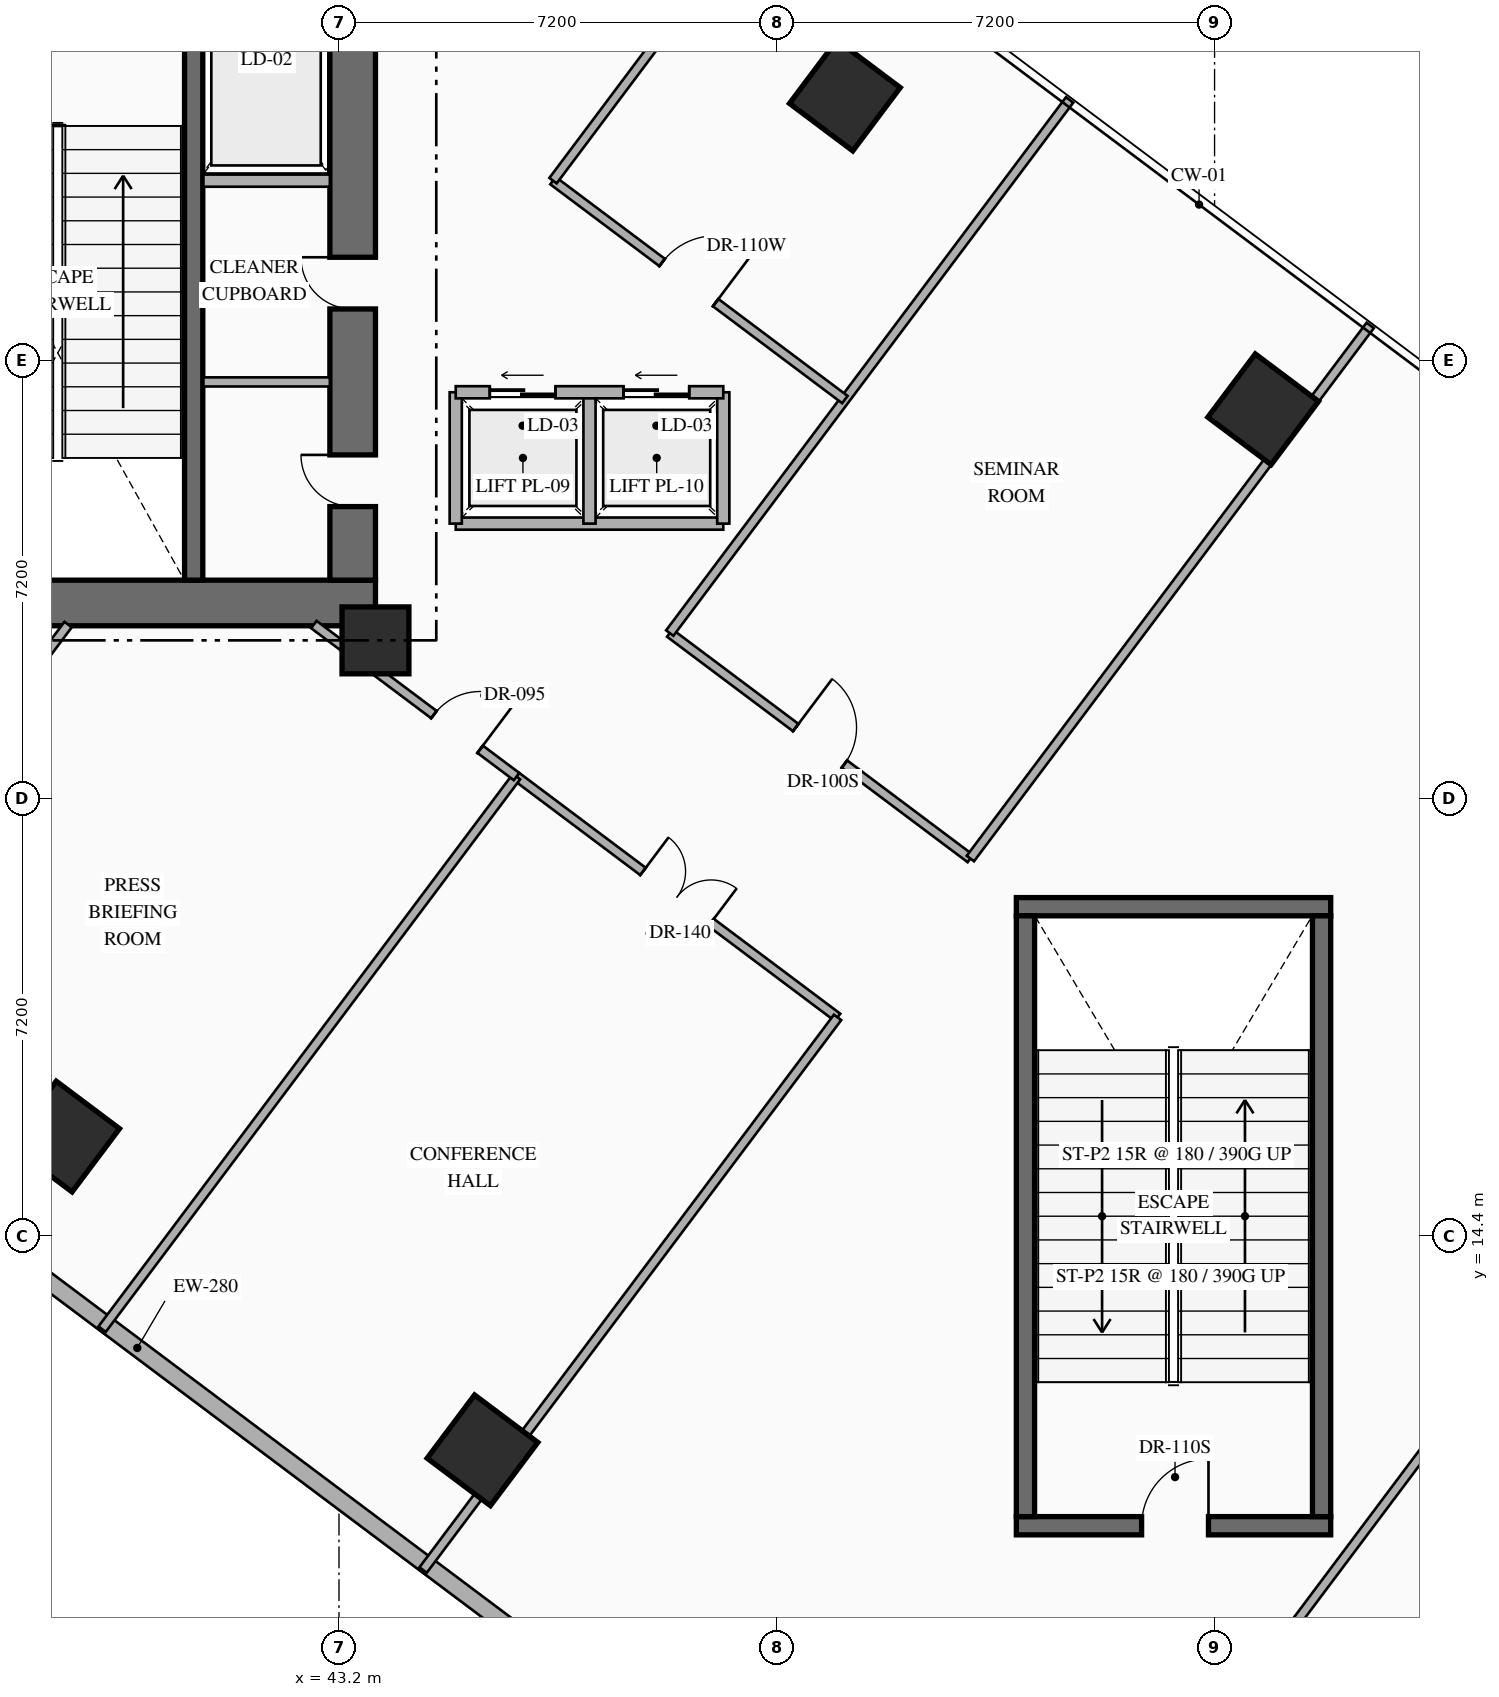
"""IFC4 building model, lengths in metres.
Left out: names, types, materials, properties, quantities, classifications, styles, units other than length and angle.
Written with IfcOpenShell. Run it as: python <this file> out.ifc"""

import sys

from ifc_helpers import new_model, si_unit, direction, frame, frame_2d, origin, origin_2d, place, context, subcontext, project, spatial, rectangle, extrude, element, fill, save


model = new_model("IFC4")
c1 = context("Model", 3, precision=1e-05, world=origin(), true_north=direction((0.0, 1.0)))
c2 = subcontext(c1, "Body", "Model", "MODEL_VIEW")
j1 = project(units=[si_unit("LENGTHUNIT", "METRE"), si_unit("PLANEANGLEUNIT", "RADIAN")], contexts=[c1])
p1 = place(None, origin())
s1 = spatial("IfcSite", under=j1, at=p1, CompositionType="ELEMENT")
p2 = place(p1, origin())
s2 = spatial("IfcBuilding", under=s1, at=p2, CompositionType="ELEMENT")
p3 = place(p2, frame((0.0, 0.0, 5.4)))
s3 = spatial("IfcBuildingStorey", under=s2, at=p3, CompositionType="ELEMENT", Elevation=5.4)
p4 = place(p3, frame((35.74, 24.815, 0.0), z_axis=(0.0, 0.0, 1.0), x_axis=(1.0, 0.0, 0.0)))
e1 = element("IfcWall", 1, at=p4, inside=s3, PredefinedType="SHEAR", context=c2, shape_type="SweptSolid", body=[
    extrude(rectangle(XDim=8.06, YDim=0.75, at=frame_2d((4.03, 0.0))), origin(), (0.0, 0.0, 1.0), 5.4),
])
p5 = place(p3, frame((43.425, 25.19, 0.0), z_axis=(0.0, 0.0, 1.0), x_axis=(0.0, 1.0, 0.0)))
e2 = element("IfcWall", 2, at=p5, inside=s3, PredefinedType="SHEAR", context=c2, shape_type="SweptSolid", body=[
    extrude(rectangle(XDim=9.48, YDim=0.75, at=frame_2d((4.74, 0.0))), origin(), (0.0, 0.0, 1.0), 5.4),
])
p6 = place(p5, frame((1.21, 0.0, 0.0)))
e3 = element("IfcOpeningElement", 3, at=p6, cuts=e2, PredefinedType="OPENING", context=c2, shape_type="SweptSolid", body=[
    extrude(rectangle(XDim=0.85, YDim=2.08, at=frame_2d((0.425, 1.04))), frame((0.0, 0.385, 0.0), z_axis=(0.0, -1.0, 0.0), x_axis=(1.0, 0.0, 0.0)), (0.0, 0.0, 1.0), 0.77),
])
p7 = place(p5, frame((4.46, 0.0, 0.0)))
e4 = element("IfcOpeningElement", 4, at=p7, cuts=e2, PredefinedType="OPENING", context=c2, shape_type="SweptSolid", body=[
    extrude(rectangle(XDim=0.85, YDim=2.08, at=frame_2d((0.425, 1.04))), frame((0.0, 0.385, 0.0), z_axis=(0.0, -1.0, 0.0), x_axis=(1.0, 0.0, 0.0)), (0.0, 0.0, 1.0), 0.77),
])
p8 = place(p3, frame((40.81, 25.19, 0.0), z_axis=(0.0, 0.0, 1.0), x_axis=(0.0, 1.0, 0.0)))
e5 = element("IfcWall", 5, at=p8, inside=s3, PredefinedType="SHEAR", context=c2, shape_type="SweptSolid", body=[
    extrude(rectangle(XDim=9.48, YDim=0.3, at=frame_2d((4.74, 0.0))), origin(), (0.0, 0.0, 1.0), 5.4),
])
p9 = place(p3, frame((54.34, 9.64, 0.0), z_axis=(0.0, 0.0, 1.0), x_axis=(1.0, 0.0, 0.0)))
e6 = element("IfcWall", 6, at=p9, inside=s3, PredefinedType="SHEAR", context=c2, shape_type="SweptSolid", body=[
    extrude(rectangle(XDim=5.17, YDim=0.3, at=frame_2d((2.585, 0.0))), origin(), (0.0, 0.0, 1.0), 5.4),
])
p10 = place(p9, frame((2.06, 0.0, 0.0)))
e7 = element("IfcOpeningElement", 7, at=p10, cuts=e6, PredefinedType="OPENING", context=c2, shape_type="SweptSolid", body=[
    extrude(rectangle(XDim=1.1, YDim=2.2, at=frame_2d((0.55, 1.1))), frame((0.0, 0.16, 0.0), z_axis=(0.0, -1.0, 0.0), x_axis=(1.0, 0.0, 0.0)), (0.0, 0.0, 1.0), 0.32),
])
p11 = place(p3, frame((54.34, 19.82, 0.0), z_axis=(0.0, 0.0, 1.0), x_axis=(1.0, 0.0, 0.0)))
e8 = element("IfcWall", 8, at=p11, inside=s3, PredefinedType="SHEAR", context=c2, shape_type="SweptSolid", body=[
    extrude(rectangle(XDim=5.17, YDim=0.3, at=frame_2d((2.585, 0.0))), origin(), (0.0, 0.0, 1.0), 5.4),
])
for number, where, z_axis, x_axis in (
    (9, (54.49, 9.79, 0.0), (0.0, 0.0, 1.0), (0.0, 1.0, 0.0)),
    (10, (59.36, 9.79, 0.0), (0.0, 0.0, 1.0), (0.0, 1.0, 0.0)),
):
    element("IfcWall", number, at=place(p3, frame(where, z_axis=z_axis, x_axis=x_axis)), inside=s3, PredefinedType="SHEAR", context=c2, shape_type="SweptSolid", body=[
        extrude(rectangle(XDim=9.88, YDim=0.3, at=frame_2d((4.94, 0.0))), origin(), (0.0, 0.0, 1.0), 5.4),
    ])
p12 = place(p3, frame((43.8, 24.2, 0.0), z_axis=(0.0, 0.0, 1.0), x_axis=(1.0, 0.0, 0.0)))
e11 = element("IfcColumn", 11, at=p12, inside=s3, PredefinedType="COLUMN", context=c2, shape_type="SweptSolid", body=[
    extrude(rectangle(XDim=1.1, YDim=1.1, at=origin_2d()), origin(), (0.0, 0.0, 1.0), 5.4),
])
for number, where, z_axis, x_axis in (
    (12, (38.68, 16.04, 0.0), (0.0, 0.0, 1.0), (0.8, -0.6, 0.0)),
    (13, (51.52, 33.16, 0.0), (0.0, 0.0, 1.0), (0.8, -0.6, 0.0)),
    (14, (45.56, 10.88, 0.0), (0.0, 0.0, 1.0), (0.8, -0.6, 0.0)),
    (15, (58.4, 28.0, 0.0), (0.0, 0.0, 1.0), (0.8, -0.6, 0.0)),
):
    element("IfcColumn", number, at=place(p3, frame(where, z_axis=z_axis, x_axis=x_axis)), inside=s3, PredefinedType="COLUMN", context=c2, shape_type="SweptSolid", body=[
        extrude(rectangle(XDim=1.3, YDim=1.3, at=origin_2d()), origin(), (0.0, 0.0, 1.0), 5.4),
    ])
p13 = place(p3, frame((54.518, 1.587, 0.0), z_axis=(0.0, 0.0, 1.0), x_axis=(-0.800001601415, 0.599997864774, 0.0)))
e16 = element("IfcWall", 16, at=p13, inside=s3, PredefinedType="STANDARD", context=c2, shape_type="SweptSolid", body=[
    extrude(rectangle(XDim=36.589, YDim=0.28, at=frame_2d((18.294, 0.0))), origin(), (0.0, 0.0, 1.0), 5.1),
])
p14 = place(p3, frame((40.97, 31.76, 0.0), z_axis=(0.0, 0.0, 1.0), x_axis=(1.0, 0.0, 0.0)))
e17 = element("IfcWall", 17, at=p14, inside=s3, PredefinedType="STANDARD", context=c2, shape_type="SweptSolid", body=[
    extrude(rectangle(XDim=2.08, YDim=0.2, at=frame_2d((1.04, 0.0))), origin(), (0.0, 0.0, 1.0), 5.1),
])
p15 = place(p3, frame((40.97, 28.45, 0.0), z_axis=(0.0, 0.0, 1.0), x_axis=(1.0, 0.0, 0.0)))
e18 = element("IfcWall", 18, at=p15, inside=s3, PredefinedType="PARTITIONING", context=c2, shape_type="SweptSolid", body=[
    extrude(rectangle(XDim=2.08, YDim=0.15, at=frame_2d((1.04, 0.0))), origin(), (0.0, 0.0, 1.0), 5.1),
])
p16 = place(p3, frame((45.12, 26.12, 0.0), z_axis=(0.0, 0.0, 1.0), x_axis=(1.0, 0.0, 0.0)))
e19 = element("IfcWall", 19, at=p16, inside=s3, PredefinedType="STANDARD", context=c2, shape_type="SweptSolid", body=[
    extrude(rectangle(XDim=4.4, YDim=0.2, at=frame_2d((2.2, 0.0))), origin(), (0.0, 0.0, 1.0), 5.1),
])
for number, where, z_axis, x_axis in (
    (20, (45.12, 26.12, 0.0), (0.0, 0.0, 1.0), (0.0, 1.0, 0.0)),
    (21, (49.52, 26.12, 0.0), (0.0, 0.0, 1.0), (0.0, 1.0, 0.0)),
    (22, (47.32, 26.12, 0.0), (0.0, 0.0, 1.0), (0.0, 1.0, 0.0)),
):
    element("IfcWall", number, at=place(p3, frame(where, z_axis=z_axis, x_axis=x_axis)), inside=s3, PredefinedType="STANDARD", context=c2, shape_type="SweptSolid", body=[
        extrude(rectangle(XDim=2.16, YDim=0.2, at=frame_2d((1.08, 0.0))), origin(), (0.0, 0.0, 1.0), 5.1),
    ])
p17 = place(p3, frame((45.12, 28.28, 0.0), z_axis=(0.0, 0.0, 1.0), x_axis=(1.0, 0.0, 0.0)))
e23 = element("IfcWall", 23, at=p17, inside=s3, PredefinedType="STANDARD", context=c2, shape_type="SweptSolid", body=[
    extrude(rectangle(XDim=4.4, YDim=0.2, at=frame_2d((2.2, 0.0))), origin(), (0.0, 0.0, 1.0), 5.1),
])
p18 = place(p17, frame((0.56, 0.0, 0.0)))
e24 = element("IfcOpeningElement", 24, at=p18, cuts=e23, PredefinedType="OPENING", context=c2, shape_type="SweptSolid", body=[
    extrude(rectangle(XDim=1.08, YDim=2.15, at=frame_2d((0.54, 1.075))), frame((0.0, 0.11, 0.0), z_axis=(0.0, -1.0, 0.0), x_axis=(1.0, 0.0, 0.0)), (0.0, 0.0, 1.0), 0.22),
])
p19 = place(p17, frame((2.76, 0.0, 0.0)))
e25 = element("IfcOpeningElement", 25, at=p19, cuts=e23, PredefinedType="OPENING", context=c2, shape_type="SweptSolid", body=[
    extrude(rectangle(XDim=1.08, YDim=2.15, at=frame_2d((0.54, 1.075))), frame((0.0, 0.11, 0.0), z_axis=(0.0, -1.0, 0.0), x_axis=(1.0, 0.0, 0.0)), (0.0, 0.0, 1.0), 0.22),
])
p20 = place(p3, frame((48.64, 24.32, 0.0), z_axis=(0.0, 0.0, 1.0), x_axis=(0.80000474051, -0.599993679268, 0.0)))
e26 = element("IfcWall", 26, at=p20, inside=s3, PredefinedType="PARTITIONING", context=c2, shape_type="SweptSolid", body=[
    extrude(rectangle(XDim=6.18, YDim=0.15, at=frame_2d((3.09, 0.0))), origin(), (0.0, 0.0, 1.0), 5.1),
])
p21 = place(p20, frame((2.59, 0.0, 0.0)))
e27 = element("IfcOpeningElement", 27, at=p21, cuts=e26, PredefinedType="OPENING", context=c2, shape_type="SweptSolid", body=[
    extrude(rectangle(XDim=1.0, YDim=2.15, at=frame_2d((0.5, 1.075))), frame((0.0, 0.085, 0.0), z_axis=(0.0, -1.0, 0.0), x_axis=(1.0, 0.0, 0.0)), (0.0, 0.0, 1.0), 0.17),
])
p22 = place(p3, frame((48.64, 24.32, 0.0), z_axis=(0.0, 0.0, 1.0), x_axis=(0.600017820398, 0.799986634391, 0.0)))
e28 = element("IfcWall", 28, at=p22, inside=s3, PredefinedType="PARTITIONING", context=c2, shape_type="SweptSolid", body=[
    extrude(rectangle(XDim=10.96, YDim=0.15, at=frame_2d((5.48, 0.0))), origin(), (0.0, 0.0, 1.0), 5.1),
])
p23 = place(p3, frame((53.584, 20.612, 0.0), z_axis=(0.0, 0.0, 1.0), x_axis=(0.600003564151, 0.799997326874, 0.0)))
e29 = element("IfcWall", 29, at=p23, inside=s3, PredefinedType="PARTITIONING", context=c2, shape_type="SweptSolid", body=[
    extrude(rectangle(XDim=10.96, YDim=0.15, at=frame_2d((5.48, 0.0))), origin(), (0.0, 0.0, 1.0), 5.1),
])
p24 = place(p3, frame((46.12, 21.96, 0.0), z_axis=(0.0, 0.0, 1.0), x_axis=(0.799991121809, -0.600011837406, 0.0)))
e30 = element("IfcWall", 30, at=p24, inside=s3, PredefinedType="PARTITIONING", context=c2, shape_type="SweptSolid", body=[
    extrude(rectangle(XDim=6.6, YDim=0.15, at=frame_2d((3.3, 0.0))), origin(), (0.0, 0.0, 1.0), 5.1),
])
p25 = place(p24, frame((2.6, 0.0, 0.0)))
e31 = element("IfcOpeningElement", 31, at=p25, cuts=e30, PredefinedType="OPENING", context=c2, shape_type="SweptSolid", body=[
    extrude(rectangle(XDim=1.4, YDim=2.3, at=frame_2d((0.7, 1.15))), frame((0.0, 0.085, 0.0), z_axis=(0.0, -1.0, 0.0), x_axis=(1.0, 0.0, 0.0)), (0.0, 0.0, 1.0), 0.17),
])
p26 = place(p3, frame((39.304, 12.872, 0.0), z_axis=(0.0, 0.0, 1.0), x_axis=(0.600013754301, 0.79998968409, 0.0)))
e32 = element("IfcWall", 32, at=p26, inside=s3, PredefinedType="PARTITIONING", context=c2, shape_type="SweptSolid", body=[
    extrude(rectangle(XDim=11.36, YDim=0.15, at=frame_2d((5.68, 0.0))), origin(), (0.0, 0.0, 1.0), 5.1),
])
p27 = place(p3, frame((44.584, 8.912, 0.0), z_axis=(0.0, 0.0, 1.0), x_axis=(0.6, 0.8, 0.0)))
e33 = element("IfcWall", 33, at=p27, inside=s3, PredefinedType="PARTITIONING", context=c2, shape_type="SweptSolid", body=[
    extrude(rectangle(XDim=11.36, YDim=0.15, at=frame_2d((5.68, 0.0))), origin(), (0.0, 0.0, 1.0), 5.1),
])
p28 = place(p3, frame((54.184, 1.712, 0.0), z_axis=(0.0, 0.0, 1.0), x_axis=(0.59999392496, 0.800004556244, 0.0)))
e34 = element("IfcWall", 34, at=p28, inside=s3, PredefinedType="PARTITIONING", context=c2, shape_type="SweptSolid", body=[
    extrude(rectangle(XDim=25.72, YDim=0.15, at=frame_2d((12.86, 0.0))), origin(), (0.0, 0.0, 1.0), 5.1),
])
p29 = place(p28, frame((12.31, 0.0, 0.0)))
e35 = element("IfcOpeningElement", 35, at=p29, cuts=e34, PredefinedType="OPENING", context=c2, shape_type="SweptSolid", body=[
    extrude(rectangle(XDim=1.1, YDim=2.24, at=frame_2d((0.55, 1.12))), frame((0.0, 0.085, 0.0), z_axis=(0.0, -1.0, 0.0), x_axis=(1.0, 0.0, 0.0)), (0.0, 0.0, 1.0), 0.17),
])
p30 = place(p3, frame((46.72, 31.76, 0.0), z_axis=(0.0, 0.0, 1.0), x_axis=(0.79999511724, -0.600006510291, 0.0)))
e36 = element("IfcWall", 36, at=p30, inside=s3, PredefinedType="PARTITIONING", context=c2, shape_type="SweptSolid", body=[
    extrude(rectangle(XDim=6.0, YDim=0.15, at=frame_2d((3.0, 0.0))), origin(), (0.0, 0.0, 1.0), 5.1),
])
p31 = place(p30, frame((2.243, 0.0, 0.0)))
e37 = element("IfcOpeningElement", 37, at=p31, cuts=e36, PredefinedType="OPENING", context=c2, shape_type="SweptSolid", body=[
    extrude(rectangle(XDim=1.1, YDim=2.16, at=frame_2d((0.55, 1.08))), frame((0.0, 0.085, 0.0), z_axis=(0.0, -1.0, 0.0), x_axis=(1.0, 0.0, 0.0)), (0.0, 0.0, 1.0), 0.17),
])
p32 = place(p3, frame((46.72, 31.76, 0.0), z_axis=(0.0, 0.0, 1.0), x_axis=(0.600006341286, 0.799995243996, 0.0)))
e38 = element("IfcWall", 38, at=p32, inside=s3, PredefinedType="PARTITIONING", context=c2, shape_type="SweptSolid", body=[
    extrude(rectangle(XDim=6.16, YDim=0.15, at=frame_2d((3.08, 0.0))), origin(), (0.0, 0.0, 1.0), 5.1),
])
p33 = place(p3, frame((42.787, 24.46, 0.0), z_axis=(0.0, 0.0, 1.0), x_axis=(0.799971872363, -0.600037501685, 0.0)))
e39 = element("IfcWall", 39, at=p33, inside=s3, PredefinedType="PARTITIONING", context=c2, shape_type="SweptSolid", body=[
    extrude(rectangle(XDim=4.167, YDim=0.15, at=frame_2d((2.083, 0.0))), origin(), (0.0, 0.0, 1.0), 5.1),
])
p34 = place(p33, frame((2.468, 0.0, 0.0)))
e40 = element("IfcOpeningElement", 40, at=p34, cuts=e39, PredefinedType="OPENING", context=c2, shape_type="SweptSolid", body=[
    extrude(rectangle(XDim=0.95, YDim=2.15, at=frame_2d((0.475, 1.075))), frame((0.0, 0.085, 0.0), z_axis=(0.0, -1.0, 0.0), x_axis=(1.0, 0.0, 0.0)), (0.0, 0.0, 1.0), 0.17),
])
p35 = place(p3, frame((33.384, 17.312, 0.0), z_axis=(0.0, 0.0, 1.0), x_axis=(0.600008743659, 0.799993442181, 0.0)))
e41 = element("IfcWall", 41, at=p35, inside=s3, PredefinedType="PARTITIONING", context=c2, shape_type="SweptSolid", body=[
    extrude(rectangle(XDim=8.935, YDim=0.15, at=frame_2d((4.468, 0.0))), origin(), (0.0, 0.0, 1.0), 5.1),
])
p36 = place(p6, origin())
e42 = element("IfcDoor", 42, at=p36, inside=s3, OperationType="SINGLE_SWING_RIGHT", PredefinedType="DOOR", context=c2, shape_type="SweptSolid", body=[
    extrude(rectangle(XDim=0.85, YDim=2.08, at=frame_2d((0.425, 1.04))), frame((0.0, 0.025, 0.0), z_axis=(0.0, -1.0, 0.0), x_axis=(1.0, 0.0, 0.0)), (0.0, 0.0, 1.0), 0.05),
])
fill(e3, e42)
p37 = place(p7, origin())
e43 = element("IfcDoor", 43, at=p37, inside=s3, OperationType="SINGLE_SWING_RIGHT", PredefinedType="DOOR", context=c2, shape_type="SweptSolid", body=[
    extrude(rectangle(XDim=0.85, YDim=2.08, at=frame_2d((0.425, 1.04))), frame((0.0, 0.025, 0.0), z_axis=(0.0, -1.0, 0.0), x_axis=(1.0, 0.0, 0.0)), (0.0, 0.0, 1.0), 0.05),
])
fill(e4, e43)
p38 = place(p10, origin())
e44 = element("IfcDoor", 44, at=p38, inside=s3, OperationType="SINGLE_SWING_RIGHT", PredefinedType="DOOR", context=c2, shape_type="SweptSolid", body=[
    extrude(rectangle(XDim=1.1, YDim=2.2, at=frame_2d((0.55, 1.1))), frame((0.0, 0.025, 0.0), z_axis=(0.0, -1.0, 0.0), x_axis=(1.0, 0.0, 0.0)), (0.0, 0.0, 1.0), 0.05),
])
fill(e7, e44)
p39 = place(p18, origin())
e45 = element("IfcDoor", 45, at=p39, inside=s3, OperationType="SLIDING_TO_LEFT", PredefinedType="USERDEFINED", context=c2, shape_type="SweptSolid", body=[
    extrude(rectangle(XDim=1.08, YDim=2.15, at=frame_2d((0.54, 1.075))), frame((0.0, 0.025, 0.0), z_axis=(0.0, -1.0, 0.0), x_axis=(1.0, 0.0, 0.0)), (0.0, 0.0, 1.0), 0.05),
])
fill(e24, e45)
p40 = place(p19, origin())
e46 = element("IfcDoor", 46, at=p40, inside=s3, OperationType="SLIDING_TO_LEFT", PredefinedType="USERDEFINED", context=c2, shape_type="SweptSolid", body=[
    extrude(rectangle(XDim=1.08, YDim=2.15, at=frame_2d((0.54, 1.075))), frame((0.0, 0.025, 0.0), z_axis=(0.0, -1.0, 0.0), x_axis=(1.0, 0.0, 0.0)), (0.0, 0.0, 1.0), 0.05),
])
fill(e25, e46)
p41 = place(p21, origin())
e47 = element("IfcDoor", 47, at=p41, inside=s3, OperationType="SINGLE_SWING_LEFT", PredefinedType="DOOR", context=c2, shape_type="SweptSolid", body=[
    extrude(rectangle(XDim=1.0, YDim=2.15, at=frame_2d((0.5, 1.075))), frame((0.0, 0.025, 0.0), z_axis=(0.0, -1.0, 0.0), x_axis=(1.0, 0.0, 0.0)), (0.0, 0.0, 1.0), 0.05),
])
fill(e27, e47)
p42 = place(p25, origin())
e48 = element("IfcDoor", 48, at=p42, inside=s3, OperationType="DOUBLE_DOOR_SINGLE_SWING", PredefinedType="DOOR", context=c2, shape_type="SweptSolid", body=[
    extrude(rectangle(XDim=1.4, YDim=2.3, at=frame_2d((0.7, 1.15))), frame((0.0, 0.025, 0.0), z_axis=(0.0, -1.0, 0.0), x_axis=(1.0, 0.0, 0.0)), (0.0, 0.0, 1.0), 0.05),
])
fill(e31, e48)
p43 = place(p31, origin())
e49 = element("IfcDoor", 49, at=p43, inside=s3, OperationType="SINGLE_SWING_RIGHT", PredefinedType="DOOR", context=c2, shape_type="SweptSolid", body=[
    extrude(rectangle(XDim=1.1, YDim=2.16, at=frame_2d((0.55, 1.08))), frame((0.0, 0.025, 0.0), z_axis=(0.0, -1.0, 0.0), x_axis=(1.0, 0.0, 0.0)), (0.0, 0.0, 1.0), 0.05),
])
fill(e37, e49)
p44 = place(p34, origin())
e50 = element("IfcDoor", 50, at=p44, inside=s3, OperationType="SINGLE_SWING_RIGHT", PredefinedType="DOOR", context=c2, shape_type="SweptSolid", body=[
    extrude(rectangle(XDim=0.95, YDim=2.15, at=frame_2d((0.475, 1.075))), frame((0.0, 0.025, 0.0), z_axis=(0.0, -1.0, 0.0), x_axis=(1.0, 0.0, 0.0)), (0.0, 0.0, 1.0), 0.05),
])
fill(e40, e50)
save(model, sys.argv[1])
